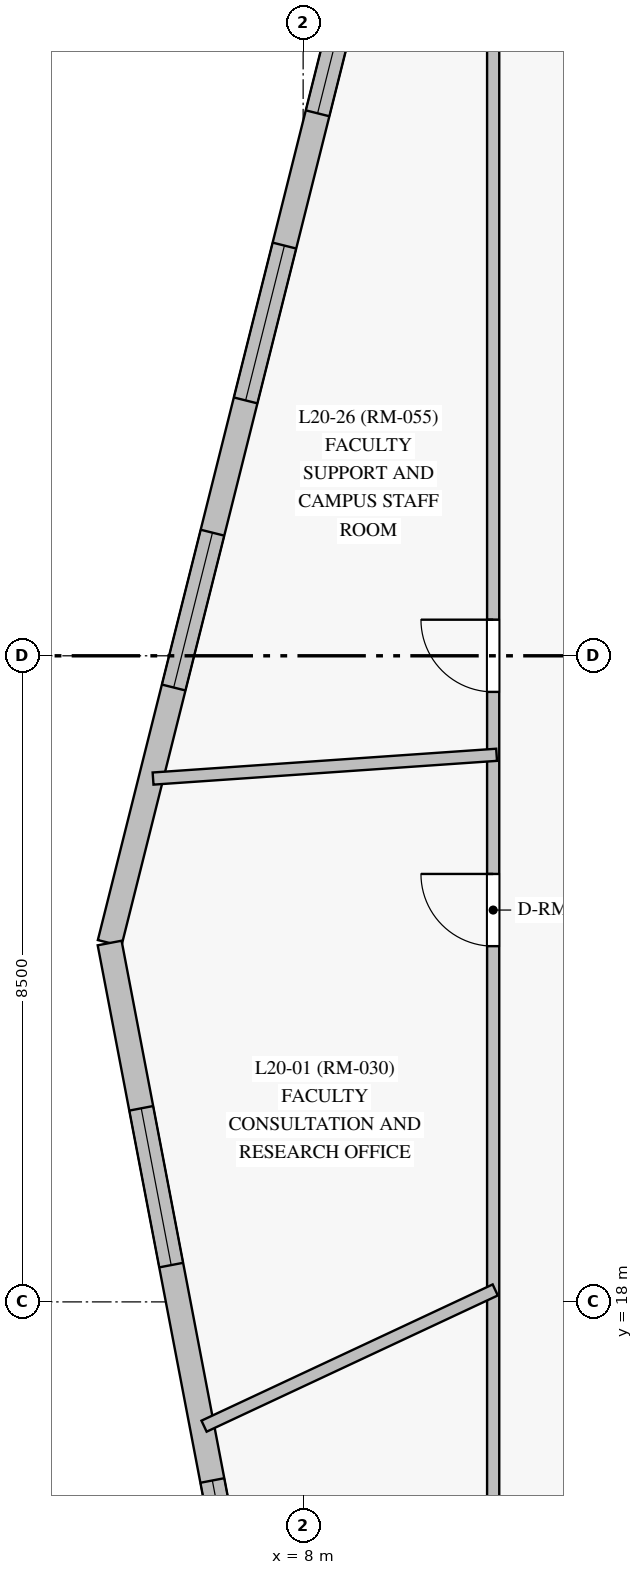
"""IFC4 building model, lengths in metres.
Left out: names, types, materials, properties, quantities, classifications, styles, units other than length and angle.
Written with IfcOpenShell. Run it as: python <this file> out.ifc"""

import sys

from ifc_helpers import new_model, si_unit, direction, frame, frame_2d, origin, origin_with_axes, place, context, subcontext, project, spatial, rectangle, extrude, source, transform, mapped, element, fill, save


model = new_model("IFC4")
c1 = context("Model", 3, precision=1e-05, world=origin(), true_north=direction((0.0, 1.0)))
c2 = subcontext(c1, "Body", "Model", "MODEL_VIEW")
j1 = project(units=[si_unit("LENGTHUNIT", "METRE"), si_unit("PLANEANGLEUNIT", "RADIAN")], contexts=[c1])
p1 = place(None, origin())
s1 = spatial("IfcSite", under=j1, at=p1, CompositionType="ELEMENT")
p2 = place(p1, origin())
s2 = spatial("IfcBuilding", under=s1, at=p2, CompositionType="ELEMENT")
p3 = place(p2, frame((0.0, 0.0, 76.9)))
s3 = spatial("IfcBuildingStorey", under=s2, at=p3, CompositionType="ELEMENT", Elevation=76.9)
p4 = place(p3, frame((9.011, 36.913, 0.0), z_axis=(0.0, 0.0, 1.0), x_axis=(-0.243104924843, -0.969999997689, 0.0)))
e1 = element("IfcWall", 1, at=p4, inside=s3, PredefinedType="SOLIDWALL", context=c2, shape_type="SweptSolid", body=[
    extrude(rectangle(XDim=14.63, YDim=0.32, at=frame_2d((7.315, 0.0))), origin(), (0.0, 0.0, 1.0), 3.35),
])
p5 = place(p4, frame((1.277, 0.0, 0.85)))
e2 = element("IfcOpeningElement", 2, at=p5, cuts=e1, PredefinedType="OPENING", context=c2, shape_type="SweptSolid", body=[
    extrude(rectangle(XDim=2.1, YDim=1.95, at=frame_2d((1.05, 0.975))), frame((0.0, 0.17, 0.0), z_axis=(0.0, -1.0, 0.0), x_axis=(1.0, 0.0, 0.0)), (0.0, 0.0, 1.0), 0.34),
])
p6 = place(p4, frame((5.171, 0.0, 0.85)))
e3 = element("IfcOpeningElement", 3, at=p6, cuts=e1, PredefinedType="OPENING", context=c2, shape_type="SweptSolid", body=[
    extrude(rectangle(XDim=2.1, YDim=1.95, at=frame_2d((1.05, 0.975))), frame((0.0, 0.17, 0.0), z_axis=(0.0, -1.0, 0.0), x_axis=(1.0, 0.0, 0.0)), (0.0, 0.0, 1.0), 0.34),
])
p7 = place(p4, frame((9.065, 0.0, 0.85)))
e4 = element("IfcOpeningElement", 4, at=p7, cuts=e1, PredefinedType="OPENING", context=c2, shape_type="SweptSolid", body=[
    extrude(rectangle(XDim=2.1, YDim=1.95, at=frame_2d((1.05, 0.975))), frame((0.0, 0.17, 0.0), z_axis=(0.0, -1.0, 0.0), x_axis=(1.0, 0.0, 0.0)), (0.0, 0.0, 1.0), 0.34),
])
p8 = place(p3, frame((5.454, 22.721, 0.0), z_axis=(0.0, 0.0, 1.0), x_axis=(0.187672475232, -0.982231664141, 0.0)))
e5 = element("IfcWall", 5, at=p8, inside=s3, PredefinedType="SOLIDWALL", context=c2, shape_type="SweptSolid", body=[
    extrude(rectangle(XDim=10.09, YDim=0.32, at=frame_2d((5.045, 0.0))), origin(), (0.0, 0.0, 1.0), 3.35),
])
p9 = place(p8, frame((2.214, 0.0, 0.85)))
e6 = element("IfcOpeningElement", 6, at=p9, cuts=e5, PredefinedType="OPENING", context=c2, shape_type="SweptSolid", body=[
    extrude(rectangle(XDim=2.1, YDim=1.95, at=frame_2d((1.05, 0.975))), frame((0.0, 0.17, 0.0), z_axis=(0.0, -1.0, 0.0), x_axis=(1.0, 0.0, 0.0)), (0.0, 0.0, 1.0), 0.34),
])
p10 = place(p8, frame((7.199, 0.0, 0.85)))
e7 = element("IfcOpeningElement", 7, at=p10, cuts=e5, PredefinedType="OPENING", context=c2, shape_type="SweptSolid", body=[
    extrude(rectangle(XDim=2.1, YDim=1.95, at=frame_2d((1.05, 0.975))), frame((0.0, 0.17, 0.0), z_axis=(0.0, -1.0, 0.0), x_axis=(1.0, 0.0, 0.0)), (0.0, 0.0, 1.0), 0.34),
])
p11 = place(p3, frame((10.5, 15.35, 0.0), z_axis=(0.0, 0.0, 1.0), x_axis=(0.0, 1.0, 0.0)))
e8 = element("IfcWall", 8, at=p11, inside=s3, PredefinedType="PARTITIONING", context=c2, shape_type="SweptSolid", body=[
    extrude(rectangle(XDim=22.3, YDim=0.16, at=frame_2d((11.15, 0.0))), origin(), (0.0, 0.0, 1.0), 2.75),
])
p12 = place(p11, frame((7.33, 0.0, 0.0)))
e9 = element("IfcOpeningElement", 9, at=p12, cuts=e8, PredefinedType="OPENING", context=c2, shape_type="SweptSolid", body=[
    extrude(rectangle(XDim=0.95, YDim=2.15, at=frame_2d((0.475, 1.075))), frame((0.0, 0.09, 0.0), z_axis=(0.0, -1.0, 0.0), x_axis=(1.0, 0.0, 0.0)), (0.0, 0.0, 1.0), 0.18),
])
p13 = place(p11, frame((10.675, 0.0, 0.0)))
e10 = element("IfcOpeningElement", 10, at=p13, cuts=e8, PredefinedType="OPENING", context=c2, shape_type="SweptSolid", body=[
    extrude(rectangle(XDim=0.95, YDim=2.15, at=frame_2d((0.475, 1.075))), frame((0.0, 0.09, 0.0), z_axis=(0.0, -1.0, 0.0), x_axis=(1.0, 0.0, 0.0)), (0.0, 0.0, 1.0), 0.18),
])
p14 = place(p3, frame((6.026, 24.885, 0.0), z_axis=(0.0, 0.0, 1.0), x_axis=(0.997618067717, 0.068979641674, 0.0)))
e11 = element("IfcWall", 11, at=p14, inside=s3, PredefinedType="PARTITIONING", context=c2, shape_type="SweptSolid", body=[
    extrude(rectangle(XDim=4.53, YDim=0.16, at=frame_2d((2.265, 0.0))), origin(), (0.0, 0.0, 1.0), 3.35),
])
p15 = place(p3, frame((10.527, 18.157, 0.0), z_axis=(0.0, 0.0, 1.0), x_axis=(-0.905772735817, -0.423763791577, 0.0)))
e12 = element("IfcWall", 12, at=p15, inside=s3, PredefinedType="PARTITIONING", context=c2, shape_type="SweptSolid", body=[
    extrude(rectangle(XDim=4.229, YDim=0.16, at=frame_2d((2.115, 0.0))), origin(), (0.0, 0.0, 1.0), 3.35),
])
m1 = source(origin_with_axes(), c2, "Body", "SweptSolid", [
    extrude(rectangle(XDim=2.1, YDim=1.95, at=frame_2d((1.05, 0.975))), frame((0.0, 0.03, 0.0), z_axis=(0.0, -1.0, 0.0), x_axis=(1.0, 0.0, 0.0)), (0.0, 0.0, 1.0), 0.06),
])
p16 = place(p5, origin())
e13 = element("IfcWindow", 13, at=p16, inside=s3, PartitioningType="SINGLE_PANEL", PredefinedType="WINDOW", context=c2, shape_type="MappedRepresentation", body=[
    mapped(m1, transform((0.0, 0.0, 0.0), scale=1.0)),
])
fill(e2, e13)
p17 = place(p6, origin())
e14 = element("IfcWindow", 14, at=p17, inside=s3, PartitioningType="SINGLE_PANEL", PredefinedType="WINDOW", context=c2, shape_type="MappedRepresentation", body=[
    mapped(m1, transform((0.0, 0.0, 0.0), scale=1.0)),
])
fill(e3, e14)
p18 = place(p7, origin())
e15 = element("IfcWindow", 15, at=p18, inside=s3, PartitioningType="SINGLE_PANEL", PredefinedType="WINDOW", context=c2, shape_type="MappedRepresentation", body=[
    mapped(m1, transform((0.0, 0.0, 0.0), scale=1.0)),
])
fill(e4, e15)
p19 = place(p9, origin())
e16 = element("IfcWindow", 16, at=p19, inside=s3, PartitioningType="SINGLE_PANEL", PredefinedType="WINDOW", context=c2, shape_type="MappedRepresentation", body=[
    mapped(m1, transform((0.0, 0.0, 0.0), scale=1.0)),
])
fill(e6, e16)
p20 = place(p10, origin())
e17 = element("IfcWindow", 17, at=p20, inside=s3, PartitioningType="SINGLE_PANEL", PredefinedType="WINDOW", context=c2, shape_type="MappedRepresentation", body=[
    mapped(m1, transform((0.0, 0.0, 0.0), scale=1.0)),
])
fill(e7, e17)
m2 = source(origin_with_axes(), c2, "Body", "SweptSolid", [
    extrude(rectangle(XDim=0.95, YDim=2.15, at=frame_2d((0.475, 1.075))), frame((0.0, 0.025, 0.0), z_axis=(0.0, -1.0, 0.0), x_axis=(1.0, 0.0, 0.0)), (0.0, 0.0, 1.0), 0.05),
])
p21 = place(p12, origin())
e18 = element("IfcDoor", 18, at=p21, inside=s3, OperationType="SINGLE_SWING_RIGHT", PredefinedType="DOOR", context=c2, shape_type="MappedRepresentation", body=[
    mapped(m2, transform((0.0, 0.0, 0.0), scale=1.0)),
])
fill(e9, e18)
p22 = place(p13, origin())
e19 = element("IfcDoor", 19, at=p22, inside=s3, OperationType="SINGLE_SWING_RIGHT", PredefinedType="DOOR", context=c2, shape_type="MappedRepresentation", body=[
    mapped(m2, transform((0.0, 0.0, 0.0), scale=1.0)),
])
fill(e10, e19)
save(model, sys.argv[1])
